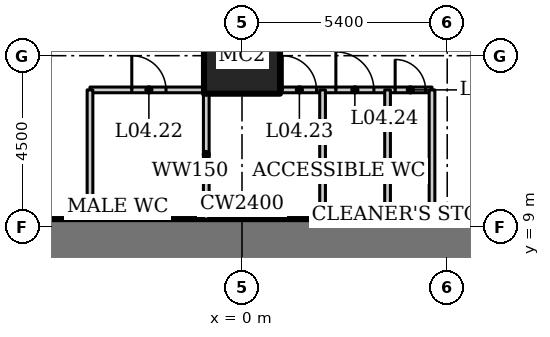
"""IFC4 building model, lengths in metres.
Left out: names, types, materials, properties, quantities, classifications, styles, units other than length and angle.
Written with IfcOpenShell. Run it as: python <this file> out.ifc"""

import sys

from ifc_helpers import new_model, si_unit, direction, frame, frame_2d, origin, origin_2d, place, context, subcontext, project, spatial, rectangle, hollow_rectangle, extrude, element, fill, save


model = new_model("IFC4")
c1 = context("Model", 3, precision=1e-05, world=origin(), true_north=direction((0.0, 1.0)))
c2 = subcontext(c1, "Body", "Model", "MODEL_VIEW")
j1 = project(units=[si_unit("LENGTHUNIT", "METRE"), si_unit("PLANEANGLEUNIT", "RADIAN")], contexts=[c1])
p1 = place(None, origin())
s1 = spatial("IfcSite", under=j1, at=p1, CompositionType="ELEMENT")
p2 = place(p1, origin())
s2 = spatial("IfcBuilding", under=s1, at=p2, CompositionType="ELEMENT")
p3 = place(p2, frame((0.0, 0.0, 27.0)))
s3 = spatial("IfcBuildingStorey", under=s2, at=p3, CompositionType="ELEMENT", Elevation=27.0)
p4 = place(p3, frame((0.0, 13.5, 0.0), z_axis=(0.0, 0.0, 1.0), x_axis=(1.0, 0.0, 0.0)))
e1 = element("IfcColumn", 1, at=p4, inside=s3, PredefinedType="COLUMN", context=c2, shape_type="SweptSolid", body=[
    extrude(hollow_rectangle(XDim=2.0, YDim=2.0, WallThickness=0.17, at=origin_2d()), origin(), (0.0, 0.0, 1.0), 5.0),
])
p5 = place(p3, frame((12.2, 8.0, 0.0), z_axis=(0.0, 0.0, 1.0), x_axis=(-1.0, 0.0, 0.0)))
e2 = element("IfcWall", 2, at=p5, inside=s3, PredefinedType="SHEAR", context=c2, shape_type="SweptSolid", body=[
    extrude(rectangle(XDim=24.4, YDim=2.4, at=frame_2d((12.2, 0.0))), origin(), (0.0, 0.0, 1.0), 5.0),
])
p6 = place(p3, frame((-4.0, 12.6, 0.0), z_axis=(0.0, 0.0, 1.0), x_axis=(1.0, 0.0, 0.0)))
e3 = element("IfcWall", 3, at=p6, inside=s3, PredefinedType="SOLIDWALL", context=c2, shape_type="SweptSolid", body=[
    extrude(rectangle(XDim=9.0, YDim=0.15, at=frame_2d((4.5, 0.0))), origin(), (0.0, 0.0, 1.0), 4.8),
])
p7 = place(p6, frame((1.1, 0.0, 0.0)))
e4 = element("IfcOpeningElement", 4, at=p7, cuts=e3, PredefinedType="OPENING", context=c2, shape_type="SweptSolid", body=[
    extrude(rectangle(XDim=0.9, YDim=2.1, at=frame_2d((0.45, 1.05))), frame((0.0, 0.085, 0.0), z_axis=(0.0, -1.0, 0.0), x_axis=(1.0, 0.0, 0.0)), (0.0, 0.0, 1.0), 0.17),
])
p8 = place(p6, frame((5.06, 0.0, 0.0)))
e5 = element("IfcOpeningElement", 5, at=p8, cuts=e3, PredefinedType="OPENING", context=c2, shape_type="SweptSolid", body=[
    extrude(rectangle(XDim=0.9, YDim=2.1, at=frame_2d((0.45, 1.05))), frame((0.0, 0.085, 0.0), z_axis=(0.0, -1.0, 0.0), x_axis=(1.0, 0.0, 0.0)), (0.0, 0.0, 1.0), 0.17),
])
p9 = place(p6, frame((6.47, 0.0, 0.0)))
e6 = element("IfcOpeningElement", 6, at=p9, cuts=e3, PredefinedType="OPENING", context=c2, shape_type="SweptSolid", body=[
    extrude(rectangle(XDim=1.0, YDim=2.1, at=frame_2d((0.5, 1.05))), frame((0.0, 0.085, 0.0), z_axis=(0.0, -1.0, 0.0), x_axis=(1.0, 0.0, 0.0)), (0.0, 0.0, 1.0), 0.17),
])
p10 = place(p6, frame((8.03, 0.0, 0.0)))
e7 = element("IfcOpeningElement", 7, at=p10, cuts=e3, PredefinedType="OPENING", context=c2, shape_type="SweptSolid", body=[
    extrude(rectangle(XDim=0.8, YDim=2.1, at=frame_2d((0.4, 1.05))), frame((0.0, 0.085, 0.0), z_axis=(0.0, -1.0, 0.0), x_axis=(1.0, 0.0, 0.0)), (0.0, 0.0, 1.0), 0.17),
])
for number, where, z_axis, x_axis in (
    (8, (-4.0, 9.2, 0.0), (0.0, 0.0, 1.0), (0.0, 1.0, 0.0)),
    (9, (5.0, 9.2, 0.0), (0.0, 0.0, 1.0), (0.0, 1.0, 0.0)),
    (10, (-0.94, 9.2, 0.0), (0.0, 0.0, 1.0), (0.0, 1.0, 0.0)),
):
    element("IfcWall", number, at=place(p3, frame(where, z_axis=z_axis, x_axis=x_axis)), inside=s3, PredefinedType="SOLIDWALL", context=c2, shape_type="SweptSolid", body=[
        extrude(rectangle(XDim=3.4, YDim=0.15, at=frame_2d((1.7, 0.0))), origin(), (0.0, 0.0, 1.0), 4.8),
    ])
p11 = place(p3, frame((2.12, 9.2, 0.0), z_axis=(0.0, 0.0, 1.0), x_axis=(0.0, 1.0, 0.0)))
e11 = element("IfcWall", 11, at=p11, inside=s3, PredefinedType="SOLIDWALL", context=c2, shape_type="SweptSolid", body=[
    extrude(rectangle(XDim=3.4, YDim=0.15, at=frame_2d((1.7, 0.0))), origin(), (0.0, 0.0, 1.0), 2.8),
])
p12 = place(p3, frame((3.83, 9.2, 0.0), z_axis=(0.0, 0.0, 1.0), x_axis=(0.0, 1.0, 0.0)))
e12 = element("IfcWall", 12, at=p12, inside=s3, PredefinedType="SOLIDWALL", context=c2, shape_type="SweptSolid", body=[
    extrude(rectangle(XDim=3.4, YDim=0.15, at=frame_2d((1.7, 0.0))), origin(), (0.0, 0.0, 1.0), 4.8),
])
p13 = place(p7, origin())
e13 = element("IfcDoor", 13, at=p13, inside=s3, OperationType="SINGLE_SWING_LEFT", PredefinedType="DOOR", context=c2, shape_type="SweptSolid", body=[
    extrude(rectangle(XDim=0.9, YDim=2.1, at=frame_2d((0.45, 1.05))), frame((0.0, 0.025, 0.0), z_axis=(0.0, -1.0, 0.0), x_axis=(1.0, 0.0, 0.0)), (0.0, 0.0, 1.0), 0.05),
])
fill(e4, e13)
p14 = place(p8, origin())
e14 = element("IfcDoor", 14, at=p14, inside=s3, OperationType="SINGLE_SWING_LEFT", PredefinedType="DOOR", context=c2, shape_type="SweptSolid", body=[
    extrude(rectangle(XDim=0.9, YDim=2.1, at=frame_2d((0.45, 1.05))), frame((0.0, 0.025, 0.0), z_axis=(0.0, -1.0, 0.0), x_axis=(1.0, 0.0, 0.0)), (0.0, 0.0, 1.0), 0.05),
])
fill(e5, e14)
p15 = place(p9, origin())
e15 = element("IfcDoor", 15, at=p15, inside=s3, OperationType="SINGLE_SWING_LEFT", PredefinedType="DOOR", context=c2, shape_type="SweptSolid", body=[
    extrude(rectangle(XDim=1.0, YDim=2.1, at=frame_2d((0.5, 1.05))), frame((0.0, 0.025, 0.0), z_axis=(0.0, -1.0, 0.0), x_axis=(1.0, 0.0, 0.0)), (0.0, 0.0, 1.0), 0.05),
])
fill(e6, e15)
p16 = place(p10, origin())
e16 = element("IfcDoor", 16, at=p16, inside=s3, OperationType="SINGLE_SWING_LEFT", PredefinedType="DOOR", context=c2, shape_type="SweptSolid", body=[
    extrude(rectangle(XDim=0.8, YDim=2.1, at=frame_2d((0.4, 1.05))), frame((0.0, 0.025, 0.0), z_axis=(0.0, -1.0, 0.0), x_axis=(1.0, 0.0, 0.0)), (0.0, 0.0, 1.0), 0.05),
])
fill(e7, e16)
save(model, sys.argv[1])
